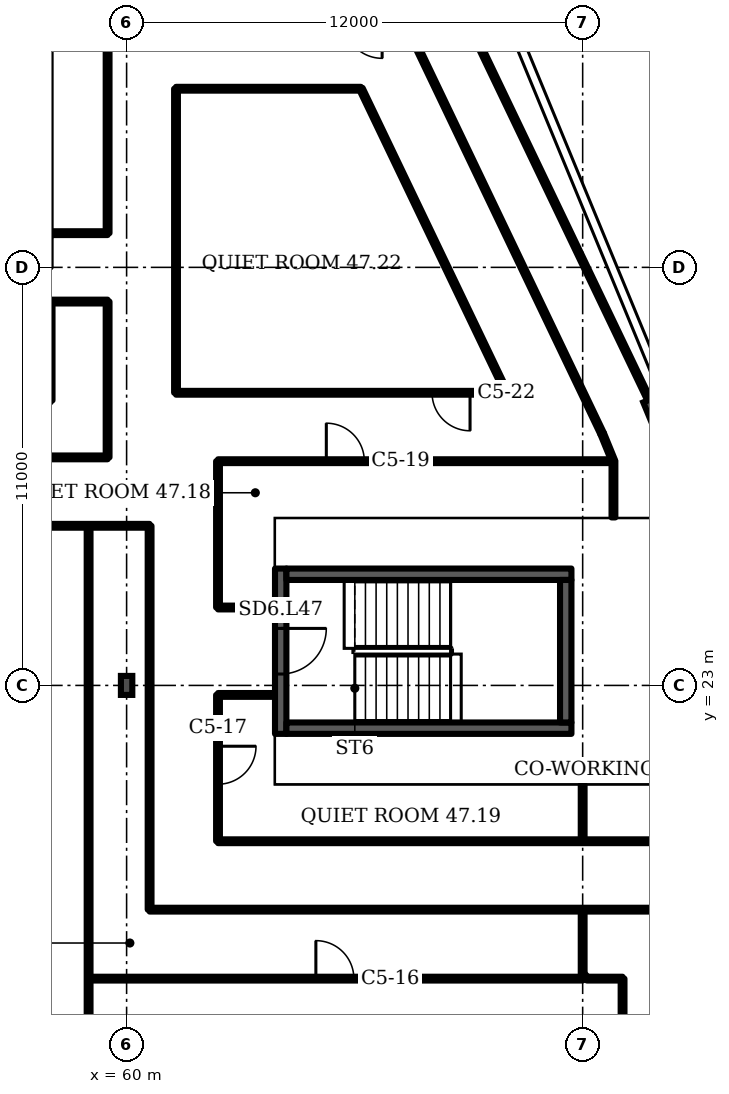
"""IFC4 building model, lengths in metres.
Left out: names, types, materials, properties, quantities, classifications, styles, units other than length and angle.
Written with IfcOpenShell. Run it as: python <this file> out.ifc"""

import sys

from ifc_helpers import new_model, si_unit, direction, frame, frame_2d, origin, origin_2d, place, context, subcontext, project, spatial, rectangle, i_section, extrude, element, fill, save


model = new_model("IFC4")
c1 = context("Model", 3, precision=1e-05, world=origin(), true_north=direction((0.0, 1.0)))
c2 = subcontext(c1, "Body", "Model", "MODEL_VIEW")
j1 = project(units=[si_unit("LENGTHUNIT", "METRE"), si_unit("PLANEANGLEUNIT", "RADIAN")], contexts=[c1])
p1 = place(None, origin())
s1 = spatial("IfcSite", under=j1, at=p1, CompositionType="ELEMENT")
p2 = place(p1, origin())
s2 = spatial("IfcBuilding", under=s1, at=p2, CompositionType="ELEMENT")
p3 = place(p2, frame((0.0, 0.0, 191.5)))
s3 = spatial("IfcBuildingStorey", under=s2, at=p3, CompositionType="ELEMENT", Elevation=191.5)
p4 = place(p3, frame((73.854, 30.219, 0.0), z_axis=(0.0, 0.0, 1.0), x_axis=(0.924325, 0.381602, 0.0)))
e1 = element("IfcColumn", 1, at=p4, inside=s3, PredefinedType="COLUMN", context=c2, shape_type="SweptSolid", body=[
    extrude(i_section(OverallWidth=0.305, OverallDepth=0.62, WebThickness=0.021, FlangeThickness=0.04, FilletRadius=0.027, at=origin_2d()), origin(), (0.0, 0.0, 1.0), 3.6),
])
p5 = place(p3, frame((60.0, 23.0, 0.0), z_axis=(0.0, 0.0, 1.0), x_axis=(1.0, 0.0, 0.0)))
e2 = element("IfcColumn", 2, at=p5, inside=s3, PredefinedType="COLUMN", context=c2, shape_type="SweptSolid", body=[
    extrude(i_section(OverallWidth=0.3, OverallDepth=0.5, WebThickness=0.014, FlangeThickness=0.028, FilletRadius=0.027, at=origin_2d()), origin(), (0.0, 0.0, 1.0), 3.6),
])
p6 = place(p3, frame((64.055, 21.725, 0.0), z_axis=(0.0, 0.0, 1.0), x_axis=(0.0, 1.0, 0.0)))
e3 = element("IfcWall", 3, at=p6, inside=s3, PredefinedType="SHEAR", context=c2, shape_type="SweptSolid", body=[
    extrude(rectangle(XDim=4.35, YDim=0.3, at=frame_2d((2.175, 0.0))), origin(), (0.0, 0.0, 1.0), 3.2),
])
p7 = place(p6, frame((1.575, 0.0, 0.0)))
e4 = element("IfcOpeningElement", 4, at=p7, cuts=e3, PredefinedType="OPENING", context=c2, shape_type="SweptSolid", body=[
    extrude(rectangle(XDim=1.2, YDim=2.1, at=frame_2d((0.6, 1.05))), frame((0.0, 0.16, 0.0), z_axis=(0.0, -1.0, 0.0), x_axis=(1.0, 0.0, 0.0)), (0.0, 0.0, 1.0), 0.32),
])
p8 = place(p3, frame((18.635, 29.0, 0.0), z_axis=(0.0, 0.0, 1.0), x_axis=(1.0, 0.0, 0.0)))
e5 = element("IfcWall", 5, at=p8, inside=s3, PredefinedType="PARTITIONING", context=c2, shape_type="SweptSolid", body=[
    extrude(rectangle(XDim=40.865, YDim=0.1, at=frame_2d((20.433, 0.0))), origin(), (0.0, 0.0, 1.0), 3.2),
])
p9 = place(p8, frame((30.545, 0.0, 0.0)))
e6 = element("IfcOpeningElement", 6, at=p9, cuts=e5, PredefinedType="OPENING", context=c2, shape_type="SweptSolid", body=[
    extrude(rectangle(XDim=1.0, YDim=2.1, at=frame_2d((0.5, 1.05))), frame((0.0, 0.06, 0.0), z_axis=(0.0, -1.0, 0.0), x_axis=(1.0, 0.0, 0.0)), (0.0, 0.0, 1.0), 0.12),
])
p10 = place(p3, frame((19.3, 27.2, 0.0), z_axis=(0.0, 0.0, 1.0), x_axis=(1.0, 0.0, 0.0)))
e7 = element("IfcWall", 7, at=p10, inside=s3, PredefinedType="PARTITIONING", context=c2, shape_type="SweptSolid", body=[
    extrude(rectangle(XDim=41.305, YDim=0.1, at=frame_2d((20.652, 0.0))), origin(), (0.0, 0.0, 1.0), 3.2),
])
p11 = place(p10, frame((32.32, 0.0, 0.0)))
e8 = element("IfcOpeningElement", 8, at=p11, cuts=e7, PredefinedType="OPENING", context=c2, shape_type="SweptSolid", body=[
    extrude(rectangle(XDim=1.8, YDim=2.1, at=frame_2d((0.9, 1.05))), frame((0.0, 0.06, 0.0), z_axis=(0.0, -1.0, 0.0), x_axis=(1.0, 0.0, 0.0)), (0.0, 0.0, 1.0), 0.12),
])
p12 = place(p3, frame((58.0, 33.1, 0.0), z_axis=(0.0, 0.0, 1.0), x_axis=(1.0, 0.0, 0.0)))
e9 = element("IfcWall", 9, at=p12, inside=s3, PredefinedType="PARTITIONING", context=c2, shape_type="SweptSolid", body=[
    extrude(rectangle(XDim=1.5, YDim=0.1, at=frame_2d((0.75, 0.0))), origin(), (0.0, 0.0, 1.0), 3.2),
])
p13 = place(p3, frame((58.02, 34.9, 0.0), z_axis=(0.0, 0.0, 1.0), x_axis=(1.0, 0.0, 0.0)))
e10 = element("IfcWall", 10, at=p13, inside=s3, PredefinedType="PARTITIONING", context=c2, shape_type="SweptSolid", body=[
    extrude(rectangle(XDim=1.48, YDim=0.1, at=frame_2d((0.74, 0.0))), origin(), (0.0, 0.0, 1.0), 3.2),
])
p14 = place(p3, frame((59.0, 13.625, 0.0), z_axis=(0.0, 0.0, 1.0), x_axis=(0.0, 1.0, 0.0)))
e11 = element("IfcWall", 11, at=p14, inside=s3, PredefinedType="PARTITIONING", context=c2, shape_type="SweptSolid", body=[
    extrude(rectangle(XDim=13.575, YDim=0.1, at=frame_2d((6.788, 0.0))), origin(), (0.0, 0.0, 1.0), 3.2),
])
p15 = place(p3, frame((59.0, 15.285, 0.0), z_axis=(0.0, 0.0, 1.0), x_axis=(1.0, 0.0, 0.0)))
e12 = element("IfcWall", 12, at=p15, inside=s3, PredefinedType="PARTITIONING", context=c2, shape_type="SweptSolid", body=[
    extrude(rectangle(XDim=13.0, YDim=0.1, at=frame_2d((6.5, 0.0))), origin(), (0.0, 0.0, 1.0), 3.2),
])
p16 = place(p15, frame((5.98, 0.0, 0.0)))
e13 = element("IfcOpeningElement", 13, at=p16, cuts=e12, PredefinedType="OPENING", context=c2, shape_type="SweptSolid", body=[
    extrude(rectangle(XDim=1.0, YDim=2.1, at=frame_2d((0.5, 1.05))), frame((0.0, 0.06, 0.0), z_axis=(0.0, -1.0, 0.0), x_axis=(1.0, 0.0, 0.0)), (0.0, 0.0, 1.0), 0.12),
])
p17 = place(p3, frame((59.5, 29.0, 0.0), z_axis=(0.0, 0.0, 1.0), x_axis=(0.0, 1.0, 0.0)))
e14 = element("IfcWall", 14, at=p17, inside=s3, PredefinedType="PARTITIONING", context=c2, shape_type="SweptSolid", body=[
    extrude(rectangle(XDim=4.1, YDim=0.1, at=frame_2d((2.05, 0.0))), origin(), (0.0, 0.0, 1.0), 3.2),
])
p18 = place(p3, frame((59.5, 34.9, 0.0), z_axis=(0.0, 0.0, 1.0), x_axis=(0.0, 1.0, 0.0)))
e15 = element("IfcWall", 15, at=p18, inside=s3, PredefinedType="PARTITIONING", context=c2, shape_type="SweptSolid", body=[
    extrude(rectangle(XDim=5.6, YDim=0.1, at=frame_2d((2.8, 0.0))), origin(), (0.0, 0.0, 1.0), 3.2),
])
p19 = place(p3, frame((60.605, 17.1, 0.0), z_axis=(0.0, 0.0, 1.0), x_axis=(0.0, 1.0, 0.0)))
e16 = element("IfcWall", 16, at=p19, inside=s3, PredefinedType="PARTITIONING", context=c2, shape_type="SweptSolid", body=[
    extrude(rectangle(XDim=10.1, YDim=0.1, at=frame_2d((5.05, 0.0))), origin(), (0.0, 0.0, 1.0), 3.2),
])
p20 = place(p3, frame((60.605, 17.1, 0.0), z_axis=(0.0, 0.0, 1.0), x_axis=(1.0, 0.0, 0.0)))
e17 = element("IfcWall", 17, at=p20, inside=s3, PredefinedType="PARTITIONING", context=c2, shape_type="SweptSolid", body=[
    extrude(rectangle(XDim=15.58, YDim=0.1, at=frame_2d((7.79, 0.0))), origin(), (0.0, 0.0, 1.0), 3.2),
])
p21 = place(p3, frame((61.3, 30.7, 0.0), z_axis=(0.0, 0.0, 1.0), x_axis=(0.0, 1.0, 0.0)))
e18 = element("IfcWall", 18, at=p21, inside=s3, PredefinedType="PARTITIONING", context=c2, shape_type="SweptSolid", body=[
    extrude(rectangle(XDim=8.0, YDim=0.1, at=frame_2d((4.0, 0.0))), origin(), (0.0, 0.0, 1.0), 3.2),
])
p22 = place(p3, frame((61.3, 30.7, 0.0), z_axis=(0.0, 0.0, 1.0), x_axis=(1.0, 0.0, 0.0)))
e19 = element("IfcWall", 19, at=p22, inside=s3, PredefinedType="PARTITIONING", context=c2, shape_type="SweptSolid", body=[
    extrude(rectangle(XDim=8.7, YDim=0.1, at=frame_2d((4.35, 0.0))), origin(), (0.0, 0.0, 1.0), 3.2),
])
p23 = place(p22, frame((6.737, 0.0, 0.0)))
e20 = element("IfcOpeningElement", 20, at=p23, cuts=e19, PredefinedType="OPENING", context=c2, shape_type="SweptSolid", body=[
    extrude(rectangle(XDim=1.0, YDim=2.1, at=frame_2d((0.5, 1.05))), frame((0.0, 0.06, 0.0), z_axis=(0.0, -1.0, 0.0), x_axis=(1.0, 0.0, 0.0)), (0.0, 0.0, 1.0), 0.12),
])
p24 = place(p3, frame((61.3, 38.7, 0.0), z_axis=(0.0, 0.0, 1.0), x_axis=(1.0, 0.0, 0.0)))
e21 = element("IfcWall", 21, at=p24, inside=s3, PredefinedType="PARTITIONING", context=c2, shape_type="SweptSolid", body=[
    extrude(rectangle(XDim=4.865, YDim=0.1, at=frame_2d((2.433, 0.0))), origin(), (0.0, 0.0, 1.0), 3.2),
])
p25 = place(p3, frame((62.405, 18.9, 0.0), z_axis=(0.0, 0.0, 1.0), x_axis=(0.0, 1.0, 0.0)))
e22 = element("IfcWall", 22, at=p25, inside=s3, PredefinedType="PARTITIONING", context=c2, shape_type="SweptSolid", body=[
    extrude(rectangle(XDim=3.85, YDim=0.1, at=frame_2d((1.925, 0.0))), origin(), (0.0, 0.0, 1.0), 3.2),
])
p26 = place(p25, frame((1.5, 0.0, 0.0)))
e23 = element("IfcOpeningElement", 23, at=p26, cuts=e22, PredefinedType="OPENING", context=c2, shape_type="SweptSolid", body=[
    extrude(rectangle(XDim=1.0, YDim=2.1, at=frame_2d((0.5, 1.05))), frame((0.0, 0.06, 0.0), z_axis=(0.0, -1.0, 0.0), x_axis=(1.0, 0.0, 0.0)), (0.0, 0.0, 1.0), 0.12),
])
p27 = place(p3, frame((62.405, 18.9, 0.0), z_axis=(0.0, 0.0, 1.0), x_axis=(1.0, 0.0, 0.0)))
e24 = element("IfcWall", 24, at=p27, inside=s3, PredefinedType="PARTITIONING", context=c2, shape_type="SweptSolid", body=[
    extrude(rectangle(XDim=14.985, YDim=0.1, at=frame_2d((7.492, 0.0))), origin(), (0.0, 0.0, 1.0), 3.2),
])
p28 = place(p3, frame((62.405, 22.75, 0.0), z_axis=(0.0, 0.0, 1.0), x_axis=(1.0, 0.0, 0.0)))
e25 = element("IfcWall", 25, at=p28, inside=s3, PredefinedType="PARTITIONING", context=c2, shape_type="SweptSolid", body=[
    extrude(rectangle(XDim=1.479, YDim=0.1, at=frame_2d((0.74, 0.0))), origin(), (0.0, 0.0, 1.0), 3.2),
])
p29 = place(p3, frame((62.405, 25.05, 0.0), z_axis=(0.0, 0.0, 1.0), x_axis=(0.0, 1.0, 0.0)))
e26 = element("IfcWall", 26, at=p29, inside=s3, PredefinedType="PARTITIONING", context=c2, shape_type="SweptSolid", body=[
    extrude(rectangle(XDim=3.85, YDim=0.1, at=frame_2d((1.925, 0.0))), origin(), (0.0, 0.0, 1.0), 3.2),
])
p30 = place(p3, frame((62.405, 25.05, 0.0), z_axis=(0.0, 0.0, 1.0), x_axis=(1.0, 0.0, 0.0)))
e27 = element("IfcWall", 27, at=p30, inside=s3, PredefinedType="PARTITIONING", context=c2, shape_type="SweptSolid", body=[
    extrude(rectangle(XDim=1.479, YDim=0.1, at=frame_2d((0.74, 0.0))), origin(), (0.0, 0.0, 1.0), 3.2),
])
p31 = place(p3, frame((62.405, 28.9, 0.0), z_axis=(0.0, 0.0, 1.0), x_axis=(1.0, 0.0, 0.0)))
e28 = element("IfcWall", 28, at=p31, inside=s3, PredefinedType="PARTITIONING", context=c2, shape_type="SweptSolid", body=[
    extrude(rectangle(XDim=10.405, YDim=0.1, at=frame_2d((5.203, 0.0))), origin(), (0.0, 0.0, 1.0), 3.2),
])
p32 = place(p31, frame((2.85, 0.0, 0.0)))
e29 = element("IfcOpeningElement", 29, at=p32, cuts=e28, PredefinedType="OPENING", context=c2, shape_type="SweptSolid", body=[
    extrude(rectangle(XDim=1.0, YDim=2.1, at=frame_2d((0.5, 1.05))), frame((0.0, 0.06, 0.0), z_axis=(0.0, -1.0, 0.0), x_axis=(1.0, 0.0, 0.0)), (0.0, 0.0, 1.0), 0.12),
])
p33 = place(p3, frame((70.0, 30.7, 0.0), z_axis=(0.0, 0.0, 1.0), x_axis=(-0.432271, 0.901748, 0.0)))
e30 = element("IfcWall", 30, at=p33, inside=s3, PredefinedType="PARTITIONING", context=c2, shape_type="SweptSolid", body=[
    extrude(rectangle(XDim=8.872, YDim=0.1, at=frame_2d((4.436, 0.0))), origin(), (0.0, 0.0, 1.0), 3.2),
])
p34 = place(p3, frame((72.0, 15.285, 0.0), z_axis=(0.0, 0.0, 1.0), x_axis=(0.0, 1.0, 0.0)))
e31 = element("IfcWall", 31, at=p34, inside=s3, PredefinedType="PARTITIONING", context=c2, shape_type="SweptSolid", body=[
    extrude(rectangle(XDim=1.815, YDim=0.1, at=frame_2d((0.908, 0.0))), origin(), (0.0, 0.0, 1.0), 3.2),
])
p35 = place(p3, frame((72.0, 18.9, 0.0), z_axis=(0.0, 0.0, 1.0), x_axis=(0.0, 1.0, 0.0)))
e32 = element("IfcWall", 32, at=p35, inside=s3, PredefinedType="PARTITIONING", context=c2, shape_type="SweptSolid", body=[
    extrude(rectangle(XDim=1.48, YDim=0.1, at=frame_2d((0.74, 0.0))), origin(), (0.0, 0.0, 1.0), 3.2),
])
p36 = place(p3, frame((72.11, 15.285, 0.0), z_axis=(0.0, 0.0, 1.0), x_axis=(1.0, 0.0, 0.0)))
e33 = element("IfcWall", 33, at=p36, inside=s3, PredefinedType="PARTITIONING", context=c2, shape_type="SweptSolid", body=[
    extrude(rectangle(XDim=0.94, YDim=0.1, at=frame_2d((0.47, 0.0))), origin(), (0.0, 0.0, 1.0), 3.2),
])
p37 = place(p3, frame((72.11, 15.285, 0.0), z_axis=(0.0, 0.0, 1.0), x_axis=(-0.675728, 0.737158, 0.0)))
e34 = element("IfcWall", 34, at=p37, inside=s3, PredefinedType="PARTITIONING", context=c2, shape_type="SweptSolid", body=[
    extrude(rectangle(XDim=0.163, YDim=0.1, at=frame_2d((0.082, 0.0))), origin(), (0.0, 0.0, 1.0), 3.2),
])
p38 = place(p3, frame((72.515, 29.62, 0.0), z_axis=(0.0, 0.0, 1.0), x_axis=(-0.43171, 0.902012, 0.0)))
e35 = element("IfcWall", 35, at=p38, inside=s3, PredefinedType="PARTITIONING", context=c2, shape_type="SweptSolid", body=[
    extrude(rectangle(XDim=12.007, YDim=0.1, at=frame_2d((6.003, 0.0))), origin(), (0.0, 0.0, 1.0), 3.2),
])
p39 = place(p3, frame((72.81, 28.9, 0.0), z_axis=(0.0, 0.0, 1.0), x_axis=(-0.379219, 0.925307, 0.0)))
e36 = element("IfcWall", 36, at=p39, inside=s3, PredefinedType="PARTITIONING", context=c2, shape_type="SweptSolid", body=[
    extrude(rectangle(XDim=0.778, YDim=0.1, at=frame_2d((0.389, 0.0))), origin(), (0.0, 0.0, 1.0), 3.2),
])
p40 = place(p3, frame((72.81, 27.42, 0.0), z_axis=(0.0, 0.0, 1.0), x_axis=(0.0, 1.0, 0.0)))
e37 = element("IfcWall", 37, at=p40, inside=s3, PredefinedType="PARTITIONING", context=c2, shape_type="SweptSolid", body=[
    extrude(rectangle(XDim=1.48, YDim=0.1, at=frame_2d((0.74, 0.0))), origin(), (0.0, 0.0, 1.0), 3.2),
])
p41 = place(p3, frame((73.05, 6.665, 0.0), z_axis=(0.0, 0.0, 1.0), x_axis=(0.0, 1.0, 0.0)))
e38 = element("IfcWall", 38, at=p41, inside=s3, PredefinedType="PARTITIONING", context=c2, shape_type="SweptSolid", body=[
    extrude(rectangle(XDim=8.62, YDim=0.1, at=frame_2d((4.31, 0.0))), origin(), (0.0, 0.0, 1.0), 3.2),
])
p42 = place(p3, frame((73.885, 30.23, 0.0), z_axis=(0.0, 0.0, 1.0), x_axis=(-0.432032, 0.901863, 0.0)))
e39 = element("IfcWall", 39, at=p42, inside=s3, PredefinedType="PARTITIONING", context=c2, shape_type="SweptSolid", body=[
    extrude(rectangle(XDim=13.015, YDim=0.1, at=frame_2d((6.507, 0.0))), origin(), (0.0, 0.0, 1.0), 3.2),
])
for number, where, z_axis, x_axis in (
    (40, (64.205, 21.875, 0.0), (0.0, 0.0, 1.0), (1.0, 0.0, 0.0)),
    (41, (64.205, 25.925, 0.0), (0.0, 0.0, 1.0), (1.0, 0.0, 0.0)),
):
    element("IfcWall", number, at=place(p3, frame(where, z_axis=z_axis, x_axis=x_axis)), inside=s3, PredefinedType="SHEAR", context=c2, shape_type="SweptSolid", body=[
        extrude(rectangle(XDim=7.5, YDim=0.3, at=frame_2d((3.75, 0.0))), origin(), (0.0, 0.0, 1.0), 3.2),
    ])
p43 = place(p3, frame((71.555, 22.025, 0.0), z_axis=(0.0, 0.0, 1.0), x_axis=(0.0, 1.0, 0.0)))
e42 = element("IfcWall", 42, at=p43, inside=s3, PredefinedType="SHEAR", context=c2, shape_type="SweptSolid", body=[
    extrude(rectangle(XDim=3.75, YDim=0.3, at=frame_2d((1.875, 0.0))), origin(), (0.0, 0.0, 1.0), 3.2),
])
p44 = place(p7, origin())
e43 = element("IfcDoor", 43, at=p44, inside=s3, OperationType="SINGLE_SWING_RIGHT", PredefinedType="DOOR", context=c2, shape_type="SweptSolid", body=[
    extrude(rectangle(XDim=1.2, YDim=2.1, at=frame_2d((0.6, 1.05))), frame((0.0, 0.025, 0.0), z_axis=(0.0, -1.0, 0.0), x_axis=(1.0, 0.0, 0.0)), (0.0, 0.0, 1.0), 0.05),
])
fill(e4, e43)
p45 = place(p16, origin())
e44 = element("IfcDoor", 44, at=p45, inside=s3, OperationType="SINGLE_SWING_LEFT", PredefinedType="DOOR", context=c2, shape_type="SweptSolid", body=[
    extrude(rectangle(XDim=1.0, YDim=2.1, at=frame_2d((0.5, 1.05))), frame((0.0, 0.025, 0.0), z_axis=(0.0, -1.0, 0.0), x_axis=(1.0, 0.0, 0.0)), (0.0, 0.0, 1.0), 0.05),
])
fill(e13, e44)
p46 = place(p26, origin())
e45 = element("IfcDoor", 45, at=p46, inside=s3, OperationType="SINGLE_SWING_RIGHT", PredefinedType="DOOR", context=c2, shape_type="SweptSolid", body=[
    extrude(rectangle(XDim=1.0, YDim=2.1, at=frame_2d((0.5, 1.05))), frame((0.0, 0.025, 0.0), z_axis=(0.0, -1.0, 0.0), x_axis=(1.0, 0.0, 0.0)), (0.0, 0.0, 1.0), 0.05),
])
fill(e23, e45)
p47 = place(p32, origin())
e46 = element("IfcDoor", 46, at=p47, inside=s3, OperationType="SINGLE_SWING_LEFT", PredefinedType="DOOR", context=c2, shape_type="SweptSolid", body=[
    extrude(rectangle(XDim=1.0, YDim=2.1, at=frame_2d((0.5, 1.05))), frame((0.0, 0.025, 0.0), z_axis=(0.0, -1.0, 0.0), x_axis=(1.0, 0.0, 0.0)), (0.0, 0.0, 1.0), 0.05),
])
fill(e29, e46)
p48 = place(p23, origin())
e47 = element("IfcDoor", 47, at=p48, inside=s3, OperationType="SINGLE_SWING_RIGHT", PredefinedType="DOOR", context=c2, shape_type="SweptSolid", body=[
    extrude(rectangle(XDim=1.0, YDim=2.1, at=frame_2d((0.5, 1.05))), frame((0.0, 0.025, 0.0), z_axis=(0.0, -1.0, 0.0), x_axis=(1.0, 0.0, 0.0)), (0.0, 0.0, 1.0), 0.05),
])
fill(e20, e47)
save(model, sys.argv[1])
